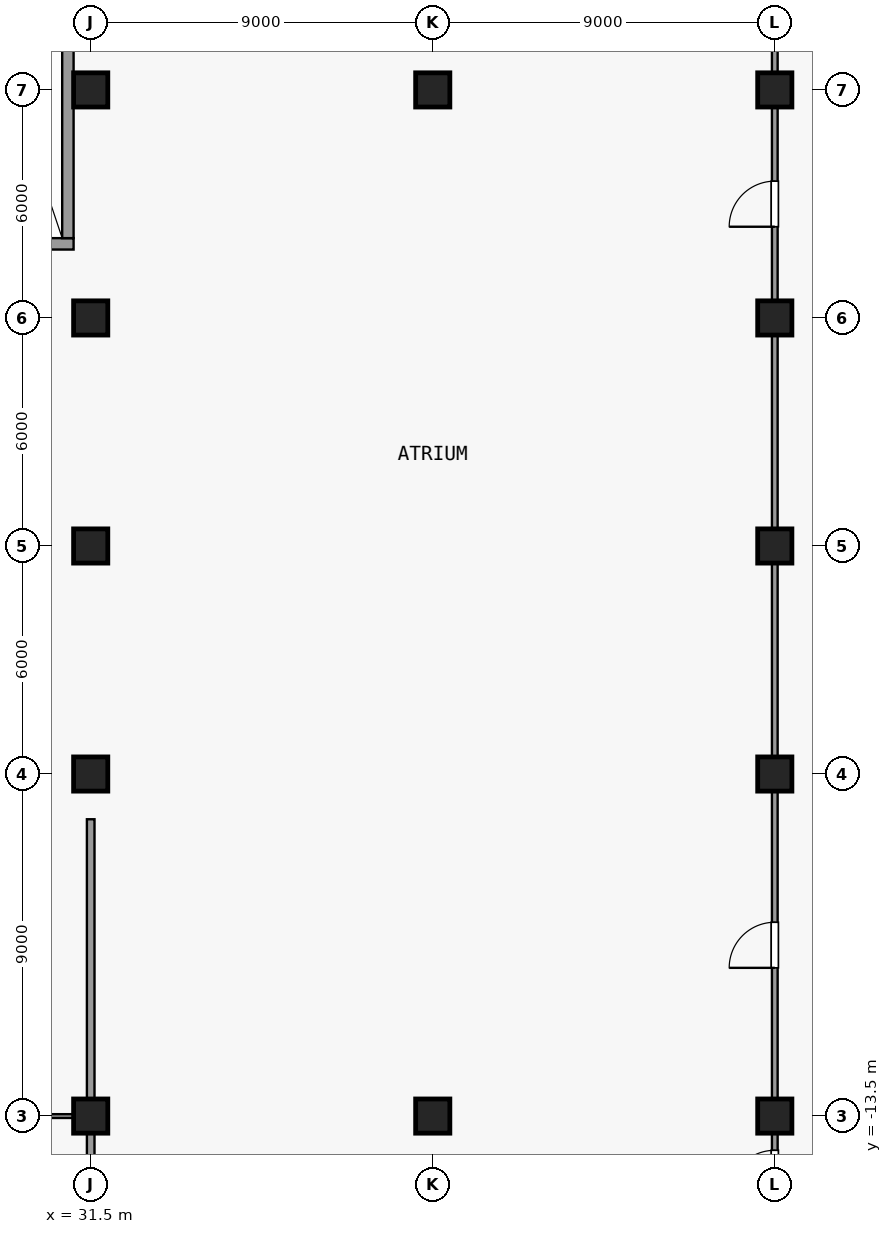
"""IFC4 building model, lengths in metres.
Left out: names, types, materials, properties, quantities, classifications, styles, units other than length and angle.
Written with IfcOpenShell. Run it as: python <this file> out.ifc"""

import sys

from ifc_helpers import new_model, si_unit, direction, frame, frame_2d, origin, origin_2d, place, context, subcontext, project, spatial, rectangle, extrude, element, fill, save


model = new_model("IFC4")
c1 = context("Model", 3, precision=1e-05, world=origin(), true_north=direction((0.0, 1.0)))
c2 = subcontext(c1, "Body", "Model", "MODEL_VIEW")
j1 = project(units=[si_unit("LENGTHUNIT", "METRE"), si_unit("PLANEANGLEUNIT", "RADIAN")], contexts=[c1])
p1 = place(None, origin())
s1 = spatial("IfcSite", under=j1, at=p1, CompositionType="ELEMENT")
p2 = place(p1, origin())
s2 = spatial("IfcBuilding", under=s1, at=p2, CompositionType="ELEMENT")
p3 = place(p2, origin())
s3 = spatial("IfcBuildingStorey", under=s2, at=p3, CompositionType="ELEMENT", Elevation=0.0)
for number, where, z_axis, x_axis in (
    (1, (31.5, -13.5, 0.0), (0.0, 0.0, 1.0), (1.0, 0.0, 0.0)),
    (2, (31.5, -4.5, 0.0), (0.0, 0.0, 1.0), (1.0, 0.0, 0.0)),
    (3, (31.5, 1.5, 0.0), (0.0, 0.0, 1.0), (1.0, 0.0, 0.0)),
    (4, (31.5, 7.5, 0.0), (0.0, 0.0, 1.0), (1.0, 0.0, 0.0)),
    (5, (31.5, 13.5, 0.0), (0.0, 0.0, 1.0), (1.0, 0.0, 0.0)),
    (6, (40.5, -13.5, 0.0), (0.0, 0.0, 1.0), (1.0, 0.0, 0.0)),
    (7, (40.5, 13.5, 0.0), (0.0, 0.0, 1.0), (1.0, 0.0, 0.0)),
    (8, (49.5, -13.5, 0.0), (0.0, 0.0, 1.0), (1.0, 0.0, 0.0)),
    (9, (49.5, -4.5, 0.0), (0.0, 0.0, 1.0), (1.0, 0.0, 0.0)),
    (10, (49.5, 1.5, 0.0), (0.0, 0.0, 1.0), (1.0, 0.0, 0.0)),
    (11, (49.5, 7.5, 0.0), (0.0, 0.0, 1.0), (1.0, 0.0, 0.0)),
    (12, (49.5, 13.5, 0.0), (0.0, 0.0, 1.0), (1.0, 0.0, 0.0)),
):
    element("IfcColumn", number, at=place(p3, frame(where, z_axis=z_axis, x_axis=x_axis)), inside=s3, PredefinedType="COLUMN", context=c2, shape_type="SweptSolid", body=[
        extrude(rectangle(XDim=0.9, YDim=0.9, at=origin_2d()), origin(), (0.0, 0.0, 1.0), 8.0),
    ])
p4 = place(p3, frame((23.25, 9.45, 0.0), z_axis=(0.0, 0.0, 1.0), x_axis=(1.0, 0.0, 0.0)))
e13 = element("IfcWall", 13, at=p4, inside=s3, PredefinedType="SOLIDWALL", context=c2, shape_type="SweptSolid", body=[
    extrude(rectangle(XDim=7.8, YDim=0.3, at=frame_2d((3.9, 0.0))), origin(), (0.0, 0.0, 1.0), 7.65),
])
p5 = place(p3, frame((30.9, 9.6, 0.0), z_axis=(0.0, 0.0, 1.0), x_axis=(0.0, 1.0, 0.0)))
e14 = element("IfcWall", 14, at=p5, inside=s3, PredefinedType="SOLIDWALL", context=c2, shape_type="SweptSolid", body=[
    extrude(rectangle(XDim=24.65, YDim=0.3, at=frame_2d((12.325, 0.0))), origin(), (0.0, 0.0, 1.0), 7.65),
])
p6 = place(p3, frame((49.5, -19.425, 0.0), z_axis=(0.0, 0.0, 1.0), x_axis=(0.0, 1.0, 0.0)))
e15 = element("IfcWall", 15, at=p6, inside=s3, PredefinedType="PARTITIONING", context=c2, shape_type="SweptSolid", body=[
    extrude(rectangle(XDim=5.475, YDim=0.15, at=frame_2d((2.738, 0.0))), origin(), (0.0, 0.0, 1.0), 7.65),
])
p7 = place(p6, frame((3.825, 0.0, 0.0)))
e16 = element("IfcOpeningElement", 16, at=p7, cuts=e15, PredefinedType="OPENING", context=c2, shape_type="SweptSolid", body=[
    extrude(rectangle(XDim=1.2, YDim=2.1, at=frame_2d((0.6, 1.05))), frame((0.0, 0.085, 0.0), z_axis=(0.0, -1.0, 0.0), x_axis=(1.0, 0.0, 0.0)), (0.0, 0.0, 1.0), 0.17),
])
p8 = place(p3, frame((49.5, -13.05, 0.0), z_axis=(0.0, 0.0, 1.0), x_axis=(0.0, 1.0, 0.0)))
e17 = element("IfcWall", 17, at=p8, inside=s3, PredefinedType="PARTITIONING", context=c2, shape_type="SweptSolid", body=[
    extrude(rectangle(XDim=8.1, YDim=0.15, at=frame_2d((4.05, 0.0))), origin(), (0.0, 0.0, 1.0), 7.65),
])
p9 = place(p8, frame((3.45, 0.0, 0.0)))
e18 = element("IfcOpeningElement", 18, at=p9, cuts=e17, PredefinedType="OPENING", context=c2, shape_type="SweptSolid", body=[
    extrude(rectangle(XDim=1.2, YDim=2.1, at=frame_2d((0.6, 1.05))), frame((0.0, 0.085, 0.0), z_axis=(0.0, -1.0, 0.0), x_axis=(1.0, 0.0, 0.0)), (0.0, 0.0, 1.0), 0.17),
])
for number, where, z_axis, x_axis in (
    (19, (49.5, -4.05, 0.0), (0.0, 0.0, 1.0), (0.0, 1.0, 0.0)),
    (20, (49.5, 1.95, 0.0), (0.0, 0.0, 1.0), (0.0, 1.0, 0.0)),
):
    element("IfcWall", number, at=place(p3, frame(where, z_axis=z_axis, x_axis=x_axis)), inside=s3, PredefinedType="PARTITIONING", context=c2, shape_type="SweptSolid", body=[
        extrude(rectangle(XDim=5.1, YDim=0.15, at=frame_2d((2.55, 0.0))), origin(), (0.0, 0.0, 1.0), 7.65),
    ])
p10 = place(p3, frame((49.5, 7.95, 0.0), z_axis=(0.0, 0.0, 1.0), x_axis=(0.0, 1.0, 0.0)))
e21 = element("IfcWall", 21, at=p10, inside=s3, PredefinedType="PARTITIONING", context=c2, shape_type="SweptSolid", body=[
    extrude(rectangle(XDim=5.1, YDim=0.15, at=frame_2d((2.55, 0.0))), origin(), (0.0, 0.0, 1.0), 7.65),
])
p11 = place(p10, frame((1.95, 0.0, 0.0)))
e22 = element("IfcOpeningElement", 22, at=p11, cuts=e21, PredefinedType="OPENING", context=c2, shape_type="SweptSolid", body=[
    extrude(rectangle(XDim=1.2, YDim=2.1, at=frame_2d((0.6, 1.05))), frame((0.0, 0.085, 0.0), z_axis=(0.0, -1.0, 0.0), x_axis=(1.0, 0.0, 0.0)), (0.0, 0.0, 1.0), 0.17),
])
p12 = place(p3, frame((49.5, 13.95, 0.0), z_axis=(0.0, 0.0, 1.0), x_axis=(0.0, 1.0, 0.0)))
e23 = element("IfcWall", 23, at=p12, inside=s3, PredefinedType="PARTITIONING", context=c2, shape_type="SweptSolid", body=[
    extrude(rectangle(XDim=5.1, YDim=0.15, at=frame_2d((2.55, 0.0))), origin(), (0.0, 0.0, 1.0), 7.65),
])
p13 = place(p3, frame((21.6, -13.5, 0.0), z_axis=(0.0, 0.0, 1.0), x_axis=(1.0, 0.0, 0.0)))
e24 = element("IfcWall", 24, at=p13, inside=s3, PredefinedType="PARTITIONING", context=c2, shape_type="SweptSolid", body=[
    extrude(rectangle(XDim=9.8, YDim=0.1, at=frame_2d((4.9, 0.0))), origin(), (0.0, 0.0, 1.0), 7.65),
])
p14 = place(p3, frame((31.5, -16.4, 0.0), z_axis=(0.0, 0.0, 1.0), x_axis=(0.0, 1.0, 0.0)))
e25 = element("IfcWall", 25, at=p14, inside=s3, PredefinedType="PARTITIONING", context=c2, shape_type="SweptSolid", body=[
    extrude(rectangle(XDim=10.71, YDim=0.2, at=frame_2d((5.355, 0.0))), origin(), (0.0, 0.0, 1.0), 7.65),
])
p15 = place(p7, origin())
e26 = element("IfcDoor", 26, at=p15, inside=s3, OperationType="SINGLE_SWING_LEFT", PredefinedType="DOOR", context=c2, shape_type="SweptSolid", body=[
    extrude(rectangle(XDim=1.2, YDim=2.1, at=frame_2d((0.6, 1.05))), frame((0.0, 0.025, 0.0), z_axis=(0.0, -1.0, 0.0), x_axis=(1.0, 0.0, 0.0)), (0.0, 0.0, 1.0), 0.05),
])
fill(e16, e26)
p16 = place(p9, origin())
e27 = element("IfcDoor", 27, at=p16, inside=s3, OperationType="SINGLE_SWING_LEFT", PredefinedType="DOOR", context=c2, shape_type="SweptSolid", body=[
    extrude(rectangle(XDim=1.2, YDim=2.1, at=frame_2d((0.6, 1.05))), frame((0.0, 0.025, 0.0), z_axis=(0.0, -1.0, 0.0), x_axis=(1.0, 0.0, 0.0)), (0.0, 0.0, 1.0), 0.05),
])
fill(e18, e27)
p17 = place(p11, origin())
e28 = element("IfcDoor", 28, at=p17, inside=s3, OperationType="SINGLE_SWING_LEFT", PredefinedType="DOOR", context=c2, shape_type="SweptSolid", body=[
    extrude(rectangle(XDim=1.2, YDim=2.1, at=frame_2d((0.6, 1.05))), frame((0.0, 0.025, 0.0), z_axis=(0.0, -1.0, 0.0), x_axis=(1.0, 0.0, 0.0)), (0.0, 0.0, 1.0), 0.05),
])
fill(e22, e28)
save(model, sys.argv[1])
